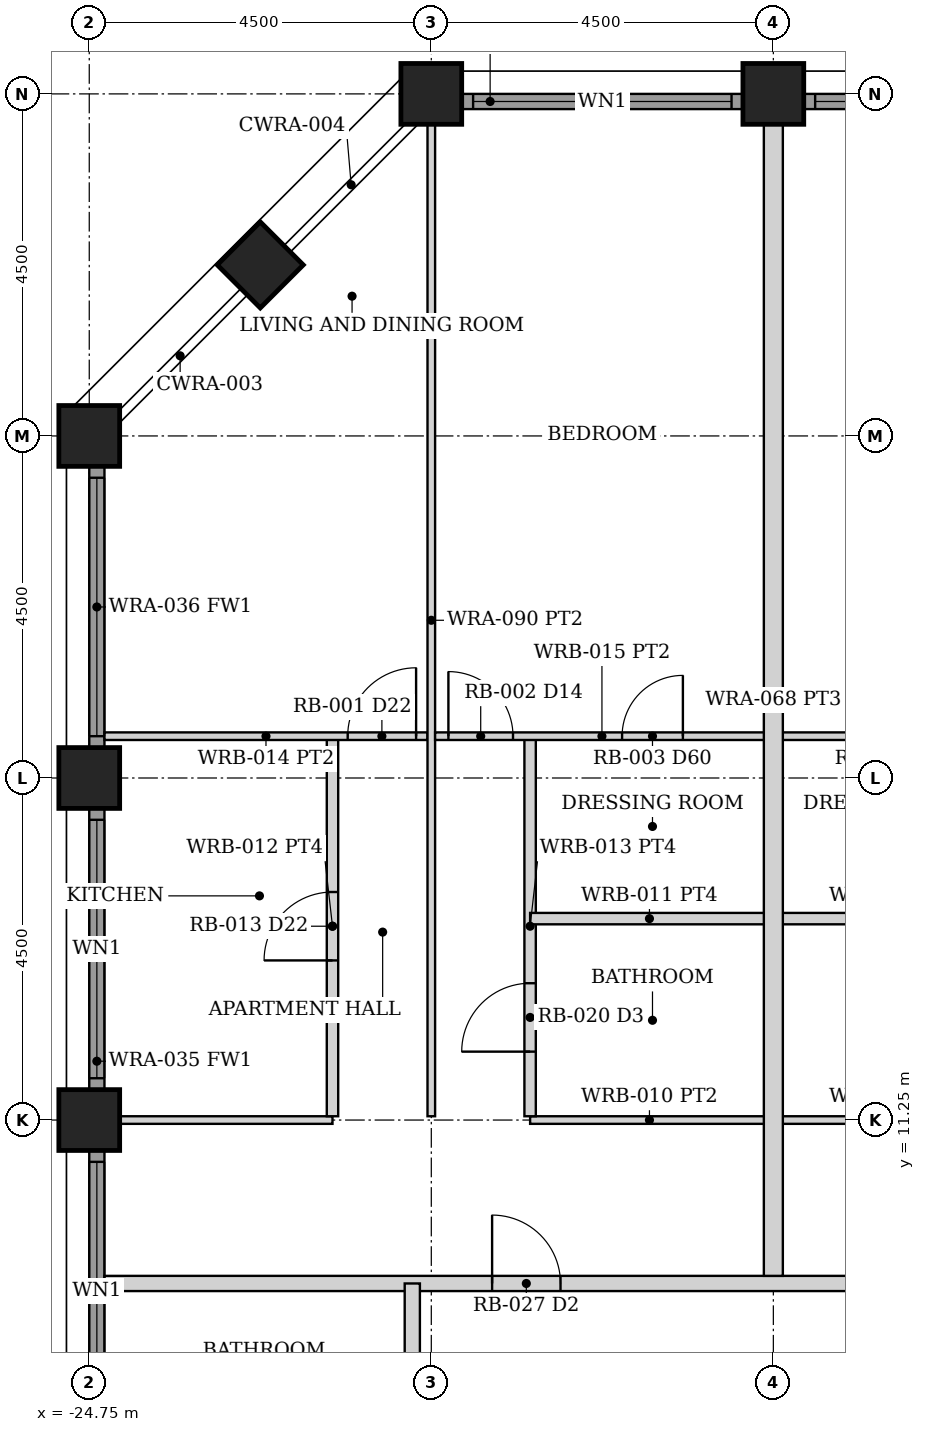
"""IFC4 building model, lengths in metres.
Left out: names, types, materials, properties, quantities, classifications, styles, units other than length and angle.
Written with IfcOpenShell. Run it as: python <this file> out.ifc"""

import sys

from ifc_helpers import new_model, si_unit, direction, frame, frame_2d, origin, origin_2d, place, context, subcontext, project, spatial, rectangle, hollow_rectangle, extrude, element, fill, save


model = new_model("IFC4")
c1 = context("Model", 3, precision=1e-05, world=origin(), true_north=direction((0.0, 1.0)))
c2 = subcontext(c1, "Body", "Model", "MODEL_VIEW")
j1 = project(units=[si_unit("LENGTHUNIT", "METRE"), si_unit("PLANEANGLEUNIT", "RADIAN")], contexts=[c1])
p1 = place(None, origin())
s1 = spatial("IfcSite", under=j1, at=p1, CompositionType="ELEMENT")
p2 = place(p1, origin())
s2 = spatial("IfcBuilding", under=s1, at=p2, CompositionType="ELEMENT")
p3 = place(p2, frame((0.0, 0.0, 37.0)))
s3 = spatial("IfcBuildingStorey", under=s2, at=p3, CompositionType="ELEMENT", Elevation=37.0)
for number, where, z_axis, x_axis in (
    (1, (-20.25, 24.75, 0.0), (0.0, 0.0, 1.0), (0.0, 1.0, 0.0)),
    (2, (-15.75, 24.75, 0.0), (0.0, 0.0, 1.0), (0.0, 1.0, 0.0)),
    (3, (-24.75, 11.25, 0.0), (0.0, 0.0, 1.0), (1.0, 0.0, 0.0)),
    (4, (-24.75, 15.75, 0.0), (0.0, 0.0, 1.0), (1.0, 0.0, 0.0)),
    (5, (-24.75, 20.25, 0.0), (0.0, 0.0, 1.0), (1.0, 0.0, 0.0)),
    (6, (-22.5, 22.5, 0.0), (0.0, 0.0, 1.0), (0.707, -0.707, 0.0)),
):
    element("IfcColumn", number, at=place(p3, frame(where, z_axis=z_axis, x_axis=x_axis)), inside=s3, PredefinedType="COLUMN", context=c2, shape_type="SweptSolid", body=[
        extrude(hollow_rectangle(XDim=0.8, YDim=0.8, WallThickness=0.07, at=origin_2d()), origin(), (0.0, 0.0, 1.0), 3.5),
    ])
p4 = place(p3, frame((-19.845, 24.65, 0.0), z_axis=(0.0, 0.0, 1.0), x_axis=(1.0, 0.0, 0.0)))
e7 = element("IfcWall", 7, at=p4, inside=s3, PredefinedType="SOLIDWALL", context=c2, shape_type="SweptSolid", body=[
    extrude(rectangle(XDim=3.69, YDim=0.2, at=frame_2d((1.845, 0.0))), origin(), (0.0, 0.0, 1.0), 2.379),
])
p5 = place(p4, frame((0.145, 0.0, 0.3)))
e8 = element("IfcOpeningElement", 8, at=p5, cuts=e7, PredefinedType="OPENING", context=c2, shape_type="SweptSolid", body=[
    extrude(rectangle(XDim=3.4, YDim=1.929, at=frame_2d((1.7, 0.964))), frame((0.0, 0.11, 0.0), z_axis=(0.0, -1.0, 0.0), x_axis=(1.0, 0.0, 0.0)), (0.0, 0.0, 1.0), 0.22),
])
p6 = place(p3, frame((-15.345, 24.65, 0.0), z_axis=(0.0, 0.0, 1.0), x_axis=(1.0, 0.0, 0.0)))
e9 = element("IfcWall", 9, at=p6, inside=s3, PredefinedType="SOLIDWALL", context=c2, shape_type="SweptSolid", body=[
    extrude(rectangle(XDim=3.69, YDim=0.2, at=frame_2d((1.845, 0.0))), origin(), (0.0, 0.0, 1.0), 2.379),
])
p7 = place(p6, frame((0.145, 0.0, 0.3)))
e10 = element("IfcOpeningElement", 10, at=p7, cuts=e9, PredefinedType="OPENING", context=c2, shape_type="SweptSolid", body=[
    extrude(rectangle(XDim=3.4, YDim=1.929, at=frame_2d((1.7, 0.964))), frame((0.0, 0.11, 0.0), z_axis=(0.0, -1.0, 0.0), x_axis=(1.0, 0.0, 0.0)), (0.0, 0.0, 1.0), 0.22),
])
p8 = place(p3, frame((-24.65, 7.155, 0.0), z_axis=(0.0, 0.0, 1.0), x_axis=(0.0, 1.0, 0.0)))
e11 = element("IfcWall", 11, at=p8, inside=s3, PredefinedType="SOLIDWALL", context=c2, shape_type="SweptSolid", body=[
    extrude(rectangle(XDim=3.69, YDim=0.2, at=frame_2d((1.845, 0.0))), origin(), (0.0, 0.0, 1.0), 2.379),
])
p9 = place(p8, frame((0.145, 0.0, 0.3)))
e12 = element("IfcOpeningElement", 12, at=p9, cuts=e11, PredefinedType="OPENING", context=c2, shape_type="SweptSolid", body=[
    extrude(rectangle(XDim=3.4, YDim=1.929, at=frame_2d((1.7, 0.964))), frame((0.0, 0.11, 0.0), z_axis=(0.0, -1.0, 0.0), x_axis=(1.0, 0.0, 0.0)), (0.0, 0.0, 1.0), 0.22),
])
p10 = place(p3, frame((-24.65, 11.655, 0.0), z_axis=(0.0, 0.0, 1.0), x_axis=(0.0, 1.0, 0.0)))
e13 = element("IfcWall", 13, at=p10, inside=s3, PredefinedType="SOLIDWALL", context=c2, shape_type="SweptSolid", body=[
    extrude(rectangle(XDim=3.69, YDim=0.2, at=frame_2d((1.845, 0.0))), origin(), (0.0, 0.0, 1.0), 2.379),
])
p11 = place(p10, frame((0.145, 0.0, 0.3)))
e14 = element("IfcOpeningElement", 14, at=p11, cuts=e13, PredefinedType="OPENING", context=c2, shape_type="SweptSolid", body=[
    extrude(rectangle(XDim=3.4, YDim=1.929, at=frame_2d((1.7, 0.964))), frame((0.0, 0.11, 0.0), z_axis=(0.0, -1.0, 0.0), x_axis=(1.0, 0.0, 0.0)), (0.0, 0.0, 1.0), 0.22),
])
p12 = place(p3, frame((-24.65, 16.155, 0.0), z_axis=(0.0, 0.0, 1.0), x_axis=(0.0, 1.0, 0.0)))
e15 = element("IfcWall", 15, at=p12, inside=s3, PredefinedType="SOLIDWALL", context=c2, shape_type="SweptSolid", body=[
    extrude(rectangle(XDim=3.69, YDim=0.2, at=frame_2d((1.845, 0.0))), origin(), (0.0, 0.0, 1.0), 2.379),
])
p13 = place(p12, frame((0.145, 0.0, 0.3)))
e16 = element("IfcOpeningElement", 16, at=p13, cuts=e15, PredefinedType="OPENING", context=c2, shape_type="SweptSolid", body=[
    extrude(rectangle(XDim=3.4, YDim=1.929, at=frame_2d((1.7, 0.964))), frame((0.0, 0.11, 0.0), z_axis=(0.0, -1.0, 0.0), x_axis=(1.0, 0.0, 0.0)), (0.0, 0.0, 1.0), 0.22),
])
p14 = place(p3, frame((-24.55, 9.1, 0.0), z_axis=(0.0, 0.0, 1.0), x_axis=(1.0, 0.0, 0.0)))
e17 = element("IfcWall", 17, at=p14, inside=s3, PredefinedType="PARTITIONING", context=c2, shape_type="SweptSolid", body=[
    extrude(rectangle(XDim=49.1, YDim=0.2, at=frame_2d((24.55, 0.0))), origin(), (0.0, 0.0, 1.0), 2.373),
])
p15 = place(p14, frame((5.1, 0.0, 0.0)))
e18 = element("IfcOpeningElement", 18, at=p15, cuts=e17, PredefinedType="OPENING", context=c2, shape_type="SweptSolid", body=[
    extrude(rectangle(XDim=0.9, YDim=2.1, at=frame_2d((0.45, 1.05))), frame((0.0, 0.11, 0.0), z_axis=(0.0, -1.0, 0.0), x_axis=(1.0, 0.0, 0.0)), (0.0, 0.0, 1.0), 0.22),
])
p16 = place(p14, frame((13.6, 0.0, 0.0)))
e19 = element("IfcOpeningElement", 19, at=p16, cuts=e17, PredefinedType="OPENING", context=c2, shape_type="SweptSolid", body=[
    extrude(rectangle(XDim=0.9, YDim=2.1, at=frame_2d((0.45, 1.05))), frame((0.0, 0.11, 0.0), z_axis=(0.0, -1.0, 0.0), x_axis=(1.0, 0.0, 0.0)), (0.0, 0.0, 1.0), 0.22),
])
p17 = place(p14, frame((18.0, 0.0, 0.0)))
e20 = element("IfcOpeningElement", 20, at=p17, cuts=e17, PredefinedType="OPENING", context=c2, shape_type="SweptSolid", body=[
    extrude(rectangle(XDim=0.9, YDim=2.1, at=frame_2d((0.45, 1.05))), frame((0.0, 0.11, 0.0), z_axis=(0.0, -1.0, 0.0), x_axis=(1.0, 0.0, 0.0)), (0.0, 0.0, 1.0), 0.22),
])
p18 = place(p14, frame((22.5, 0.0, 0.0)))
e21 = element("IfcOpeningElement", 21, at=p18, cuts=e17, PredefinedType="OPENING", context=c2, shape_type="SweptSolid", body=[
    extrude(rectangle(XDim=0.9, YDim=2.1, at=frame_2d((0.45, 1.05))), frame((0.0, 0.11, 0.0), z_axis=(0.0, -1.0, 0.0), x_axis=(1.0, 0.0, 0.0)), (0.0, 0.0, 1.0), 0.22),
])
p19 = place(p14, frame((27.0, 0.0, 0.0)))
e22 = element("IfcOpeningElement", 22, at=p19, cuts=e17, PredefinedType="OPENING", context=c2, shape_type="SweptSolid", body=[
    extrude(rectangle(XDim=0.9, YDim=2.1, at=frame_2d((0.45, 1.05))), frame((0.0, 0.11, 0.0), z_axis=(0.0, -1.0, 0.0), x_axis=(1.0, 0.0, 0.0)), (0.0, 0.0, 1.0), 0.22),
])
p20 = place(p14, frame((31.6, 0.0, 0.0)))
e23 = element("IfcOpeningElement", 23, at=p20, cuts=e17, PredefinedType="OPENING", context=c2, shape_type="SweptSolid", body=[
    extrude(rectangle(XDim=0.9, YDim=2.1, at=frame_2d((0.45, 1.05))), frame((0.0, 0.11, 0.0), z_axis=(0.0, -1.0, 0.0), x_axis=(1.0, 0.0, 0.0)), (0.0, 0.0, 1.0), 0.22),
])
p21 = place(p14, frame((43.1, 0.0, 0.0)))
e24 = element("IfcOpeningElement", 24, at=p21, cuts=e17, PredefinedType="OPENING", context=c2, shape_type="SweptSolid", body=[
    extrude(rectangle(XDim=0.9, YDim=2.1, at=frame_2d((0.45, 1.05))), frame((0.0, 0.11, 0.0), z_axis=(0.0, -1.0, 0.0), x_axis=(1.0, 0.0, 0.0)), (0.0, 0.0, 1.0), 0.22),
])
p22 = place(p3, frame((-20.5, -9.1, 0.0), z_axis=(0.0, 0.0, 1.0), x_axis=(0.0, 1.0, 0.0)))
e25 = element("IfcWall", 25, at=p22, inside=s3, PredefinedType="PARTITIONING", context=c2, shape_type="SweptSolid", body=[
    extrude(rectangle(XDim=18.2, YDim=0.2, at=frame_2d((9.1, 0.0))), origin(), (0.0, 0.0, 1.0), 2.373),
])
p23 = place(p22, frame((6.4, 0.0, 0.0)))
e26 = element("IfcOpeningElement", 26, at=p23, cuts=e25, PredefinedType="OPENING", context=c2, shape_type="SweptSolid", body=[
    extrude(rectangle(XDim=0.9, YDim=2.1, at=frame_2d((0.45, 1.05))), frame((0.0, 0.11, 0.0), z_axis=(0.0, -1.0, 0.0), x_axis=(1.0, 0.0, 0.0)), (0.0, 0.0, 1.0), 0.22),
])
p24 = place(p3, frame((-24.35, 11.25, 0.0), z_axis=(0.0, 0.0, 1.0), x_axis=(1.0, 0.0, 0.0)))
e27 = element("IfcWall", 27, at=p24, inside=s3, PredefinedType="PARTITIONING", context=c2, shape_type="SweptSolid", body=[
    extrude(rectangle(XDim=2.8, YDim=0.1, at=frame_2d((1.4, 0.0))), origin(), (0.0, 0.0, 1.0), 2.373),
])
p25 = place(p3, frame((-21.55, 11.3, 0.0), z_axis=(0.0, 0.0, 1.0), x_axis=(0.0, 1.0, 0.0)))
e28 = element("IfcWall", 28, at=p25, inside=s3, PredefinedType="PARTITIONING", context=c2, shape_type="SweptSolid", body=[
    extrude(rectangle(XDim=5.0, YDim=0.15, at=frame_2d((2.5, 0.0))), origin(), (0.0, 0.0, 1.0), 2.373),
])
p26 = place(p25, frame((2.05, 0.0, 0.0)))
e29 = element("IfcOpeningElement", 29, at=p26, cuts=e28, PredefinedType="OPENING", context=c2, shape_type="SweptSolid", body=[
    extrude(rectangle(XDim=0.9, YDim=2.1, at=frame_2d((0.45, 1.05))), frame((0.0, 0.085, 0.0), z_axis=(0.0, -1.0, 0.0), x_axis=(1.0, 0.0, 0.0)), (0.0, 0.0, 1.0), 0.17),
])
p27 = place(p3, frame((-24.55, 16.3, 0.0), z_axis=(0.0, 0.0, 1.0), x_axis=(1.0, 0.0, 0.0)))
e30 = element("IfcWall", 30, at=p27, inside=s3, PredefinedType="PARTITIONING", context=c2, shape_type="SweptSolid", body=[
    extrude(rectangle(XDim=4.25, YDim=0.1, at=frame_2d((2.125, 0.0))), origin(), (0.0, 0.0, 1.0), 2.373),
])
p28 = place(p27, frame((3.2, 0.0, 0.0)))
e31 = element("IfcOpeningElement", 31, at=p28, cuts=e30, PredefinedType="OPENING", context=c2, shape_type="SweptSolid", body=[
    extrude(rectangle(XDim=0.9, YDim=2.1, at=frame_2d((0.45, 1.05))), frame((0.0, 0.06, 0.0), z_axis=(0.0, -1.0, 0.0), x_axis=(1.0, 0.0, 0.0)), (0.0, 0.0, 1.0), 0.12),
])
p29 = place(p3, frame((-20.25, 11.3, 0.0), z_axis=(0.0, 0.0, 1.0), x_axis=(0.0, 1.0, 0.0)))
e32 = element("IfcWall", 32, at=p29, inside=s3, PredefinedType="PARTITIONING", context=c2, shape_type="SweptSolid", body=[
    extrude(rectangle(XDim=13.05, YDim=0.1, at=frame_2d((6.525, 0.0))), origin(), (0.0, 0.0, 1.0), 2.373),
])
p30 = place(p3, frame((-18.95, 11.25, 0.0), z_axis=(0.0, 0.0, 1.0), x_axis=(1.0, 0.0, 0.0)))
e33 = element("IfcWall", 33, at=p30, inside=s3, PredefinedType="PARTITIONING", context=c2, shape_type="SweptSolid", body=[
    extrude(rectangle(XDim=3.14, YDim=0.1, at=frame_2d((1.57, 0.0))), origin(), (0.0, 0.0, 1.0), 2.373),
])
p31 = place(p3, frame((-18.95, 11.3, 0.0), z_axis=(0.0, 0.0, 1.0), x_axis=(0.0, 1.0, 0.0)))
e34 = element("IfcWall", 34, at=p31, inside=s3, PredefinedType="PARTITIONING", context=c2, shape_type="SweptSolid", body=[
    extrude(rectangle(XDim=5.0, YDim=0.15, at=frame_2d((2.5, 0.0))), origin(), (0.0, 0.0, 1.0), 2.373),
])
p32 = place(p31, frame((0.85, 0.0, 0.0)))
e35 = element("IfcOpeningElement", 35, at=p32, cuts=e34, PredefinedType="OPENING", context=c2, shape_type="SweptSolid", body=[
    extrude(rectangle(XDim=0.9, YDim=2.1, at=frame_2d((0.45, 1.05))), frame((0.0, 0.085, 0.0), z_axis=(0.0, -1.0, 0.0), x_axis=(1.0, 0.0, 0.0)), (0.0, 0.0, 1.0), 0.17),
])
p33 = place(p3, frame((-20.2, 16.3, 0.0), z_axis=(0.0, 0.0, 1.0), x_axis=(1.0, 0.0, 0.0)))
e36 = element("IfcWall", 36, at=p33, inside=s3, PredefinedType="PARTITIONING", context=c2, shape_type="SweptSolid", body=[
    extrude(rectangle(XDim=4.39, YDim=0.1, at=frame_2d((2.195, 0.0))), origin(), (0.0, 0.0, 1.0), 2.373),
])
p34 = place(p33, frame((0.175, 0.0, 0.0)))
e37 = element("IfcOpeningElement", 37, at=p34, cuts=e36, PredefinedType="OPENING", context=c2, shape_type="SweptSolid", body=[
    extrude(rectangle(XDim=0.85, YDim=2.1, at=frame_2d((0.425, 1.05))), frame((0.0, 0.06, 0.0), z_axis=(0.0, -1.0, 0.0), x_axis=(1.0, 0.0, 0.0)), (0.0, 0.0, 1.0), 0.12),
])
p35 = place(p33, frame((2.46, 0.0, 0.0)))
e38 = element("IfcOpeningElement", 38, at=p35, cuts=e36, PredefinedType="OPENING", context=c2, shape_type="SweptSolid", body=[
    extrude(rectangle(XDim=0.8, YDim=2.1, at=frame_2d((0.4, 1.05))), frame((0.0, 0.06, 0.0), z_axis=(0.0, -1.0, 0.0), x_axis=(1.0, 0.0, 0.0)), (0.0, 0.0, 1.0), 0.12),
])
p36 = place(p3, frame((-18.95, 13.9, 0.0), z_axis=(0.0, 0.0, 1.0), x_axis=(1.0, 0.0, 0.0)))
e39 = element("IfcWall", 39, at=p36, inside=s3, PredefinedType="PARTITIONING", context=c2, shape_type="SweptSolid", body=[
    extrude(rectangle(XDim=3.14, YDim=0.15, at=frame_2d((1.57, 0.0))), origin(), (0.0, 0.0, 1.0), 2.373),
])
p37 = place(p3, frame((-15.69, 11.25, 0.0), z_axis=(0.0, 0.0, 1.0), x_axis=(1.0, 0.0, 0.0)))
e40 = element("IfcWall", 40, at=p37, inside=s3, PredefinedType="PARTITIONING", context=c2, shape_type="SweptSolid", body=[
    extrude(rectangle(XDim=3.14, YDim=0.1, at=frame_2d((1.57, 0.0))), origin(), (0.0, 0.0, 1.0), 2.373),
])
p38 = place(p3, frame((-15.69, 16.3, 0.0), z_axis=(0.0, 0.0, 1.0), x_axis=(1.0, 0.0, 0.0)))
e41 = element("IfcWall", 41, at=p38, inside=s3, PredefinedType="PARTITIONING", context=c2, shape_type="SweptSolid", body=[
    extrude(rectangle(XDim=4.39, YDim=0.1, at=frame_2d((2.195, 0.0))), origin(), (0.0, 0.0, 1.0), 2.373),
])
p39 = place(p38, frame((3.365, 0.0, 0.0)))
e42 = element("IfcOpeningElement", 42, at=p39, cuts=e41, PredefinedType="OPENING", context=c2, shape_type="SweptSolid", body=[
    extrude(rectangle(XDim=0.85, YDim=2.1, at=frame_2d((0.425, 1.05))), frame((0.0, 0.06, 0.0), z_axis=(0.0, -1.0, 0.0), x_axis=(1.0, 0.0, 0.0)), (0.0, 0.0, 1.0), 0.12),
])
p40 = place(p38, frame((1.13, 0.0, 0.0)))
e43 = element("IfcOpeningElement", 43, at=p40, cuts=e41, PredefinedType="OPENING", context=c2, shape_type="SweptSolid", body=[
    extrude(rectangle(XDim=0.8, YDim=2.1, at=frame_2d((0.4, 1.05))), frame((0.0, 0.06, 0.0), z_axis=(0.0, -1.0, 0.0), x_axis=(1.0, 0.0, 0.0)), (0.0, 0.0, 1.0), 0.12),
])
p41 = place(p3, frame((-15.69, 13.9, 0.0), z_axis=(0.0, 0.0, 1.0), x_axis=(1.0, 0.0, 0.0)))
e44 = element("IfcWall", 44, at=p41, inside=s3, PredefinedType="PARTITIONING", context=c2, shape_type="SweptSolid", body=[
    extrude(rectangle(XDim=3.14, YDim=0.15, at=frame_2d((1.57, 0.0))), origin(), (0.0, 0.0, 1.0), 2.373),
])
p42 = place(p3, frame((-15.75, 9.2, 0.0), z_axis=(0.0, 0.0, 1.0), x_axis=(0.0, 1.0, 0.0)))
e45 = element("IfcWall", 45, at=p42, inside=s3, PredefinedType="PARTITIONING", context=c2, shape_type="SweptSolid", body=[
    extrude(rectangle(XDim=15.15, YDim=0.25, at=frame_2d((7.575, 0.0))), origin(), (0.0, 0.0, 1.0), 2.373),
])
p43 = place(p5, origin())
e46 = element("IfcWindow", 46, at=p43, inside=s3, PartitioningType="SINGLE_PANEL", PredefinedType="WINDOW", context=c2, shape_type="SweptSolid", body=[
    extrude(rectangle(XDim=3.4, YDim=1.929, at=frame_2d((1.7, 0.964))), frame((0.0, 0.03, 0.0), z_axis=(0.0, -1.0, 0.0), x_axis=(1.0, 0.0, 0.0)), (0.0, 0.0, 1.0), 0.06),
])
fill(e8, e46)
p44 = place(p7, origin())
e47 = element("IfcWindow", 47, at=p44, inside=s3, PartitioningType="SINGLE_PANEL", PredefinedType="WINDOW", context=c2, shape_type="SweptSolid", body=[
    extrude(rectangle(XDim=3.4, YDim=1.929, at=frame_2d((1.7, 0.964))), frame((0.0, 0.03, 0.0), z_axis=(0.0, -1.0, 0.0), x_axis=(1.0, 0.0, 0.0)), (0.0, 0.0, 1.0), 0.06),
])
fill(e10, e47)
p45 = place(p9, origin())
e48 = element("IfcWindow", 48, at=p45, inside=s3, PartitioningType="SINGLE_PANEL", PredefinedType="WINDOW", context=c2, shape_type="SweptSolid", body=[
    extrude(rectangle(XDim=3.4, YDim=1.929, at=frame_2d((1.7, 0.964))), frame((0.0, 0.03, 0.0), z_axis=(0.0, -1.0, 0.0), x_axis=(1.0, 0.0, 0.0)), (0.0, 0.0, 1.0), 0.06),
])
fill(e12, e48)
p46 = place(p11, origin())
e49 = element("IfcWindow", 49, at=p46, inside=s3, PartitioningType="SINGLE_PANEL", PredefinedType="WINDOW", context=c2, shape_type="SweptSolid", body=[
    extrude(rectangle(XDim=3.4, YDim=1.929, at=frame_2d((1.7, 0.964))), frame((0.0, 0.03, 0.0), z_axis=(0.0, -1.0, 0.0), x_axis=(1.0, 0.0, 0.0)), (0.0, 0.0, 1.0), 0.06),
])
fill(e14, e49)
p47 = place(p13, origin())
e50 = element("IfcWindow", 50, at=p47, inside=s3, PartitioningType="SINGLE_PANEL", PredefinedType="WINDOW", context=c2, shape_type="SweptSolid", body=[
    extrude(rectangle(XDim=3.4, YDim=1.929, at=frame_2d((1.7, 0.964))), frame((0.0, 0.03, 0.0), z_axis=(0.0, -1.0, 0.0), x_axis=(1.0, 0.0, 0.0)), (0.0, 0.0, 1.0), 0.06),
])
fill(e16, e50)
p48 = place(p15, origin())
e51 = element("IfcDoor", 51, at=p48, inside=s3, OperationType="SINGLE_SWING_LEFT", PredefinedType="DOOR", context=c2, shape_type="SweptSolid", body=[
    extrude(rectangle(XDim=0.9, YDim=2.1, at=frame_2d((0.45, 1.05))), frame((0.0, 0.025, 0.0), z_axis=(0.0, -1.0, 0.0), x_axis=(1.0, 0.0, 0.0)), (0.0, 0.0, 1.0), 0.05),
])
fill(e18, e51)
p49 = place(p26, origin())
e52 = element("IfcDoor", 52, at=p49, inside=s3, OperationType="SINGLE_SWING_LEFT", PredefinedType="DOOR", context=c2, shape_type="SweptSolid", body=[
    extrude(rectangle(XDim=0.9, YDim=2.1, at=frame_2d((0.45, 1.05))), frame((0.0, 0.025, 0.0), z_axis=(0.0, -1.0, 0.0), x_axis=(1.0, 0.0, 0.0)), (0.0, 0.0, 1.0), 0.05),
])
fill(e29, e52)
p50 = place(p28, origin())
e53 = element("IfcDoor", 53, at=p50, inside=s3, OperationType="SINGLE_SWING_RIGHT", PredefinedType="DOOR", context=c2, shape_type="SweptSolid", body=[
    extrude(rectangle(XDim=0.9, YDim=2.1, at=frame_2d((0.45, 1.05))), frame((0.0, 0.025, 0.0), z_axis=(0.0, -1.0, 0.0), x_axis=(1.0, 0.0, 0.0)), (0.0, 0.0, 1.0), 0.05),
])
fill(e31, e53)
p51 = place(p34, origin())
e54 = element("IfcDoor", 54, at=p51, inside=s3, OperationType="SINGLE_SWING_LEFT", PredefinedType="DOOR", context=c2, shape_type="SweptSolid", body=[
    extrude(rectangle(XDim=0.85, YDim=2.1, at=frame_2d((0.425, 1.05))), frame((0.0, 0.025, 0.0), z_axis=(0.0, -1.0, 0.0), x_axis=(1.0, 0.0, 0.0)), (0.0, 0.0, 1.0), 0.05),
])
fill(e37, e54)
p52 = place(p32, origin())
e55 = element("IfcDoor", 55, at=p52, inside=s3, OperationType="SINGLE_SWING_LEFT", PredefinedType="DOOR", context=c2, shape_type="SweptSolid", body=[
    extrude(rectangle(XDim=0.9, YDim=2.1, at=frame_2d((0.45, 1.05))), frame((0.0, 0.025, 0.0), z_axis=(0.0, -1.0, 0.0), x_axis=(1.0, 0.0, 0.0)), (0.0, 0.0, 1.0), 0.05),
])
fill(e35, e55)
p53 = place(p35, origin())
e56 = element("IfcDoor", 56, at=p53, inside=s3, OperationType="SINGLE_SWING_RIGHT", PredefinedType="DOOR", context=c2, shape_type="SweptSolid", body=[
    extrude(rectangle(XDim=0.8, YDim=2.1, at=frame_2d((0.4, 1.05))), frame((0.0, 0.025, 0.0), z_axis=(0.0, -1.0, 0.0), x_axis=(1.0, 0.0, 0.0)), (0.0, 0.0, 1.0), 0.05),
])
fill(e38, e56)
save(model, sys.argv[1])
